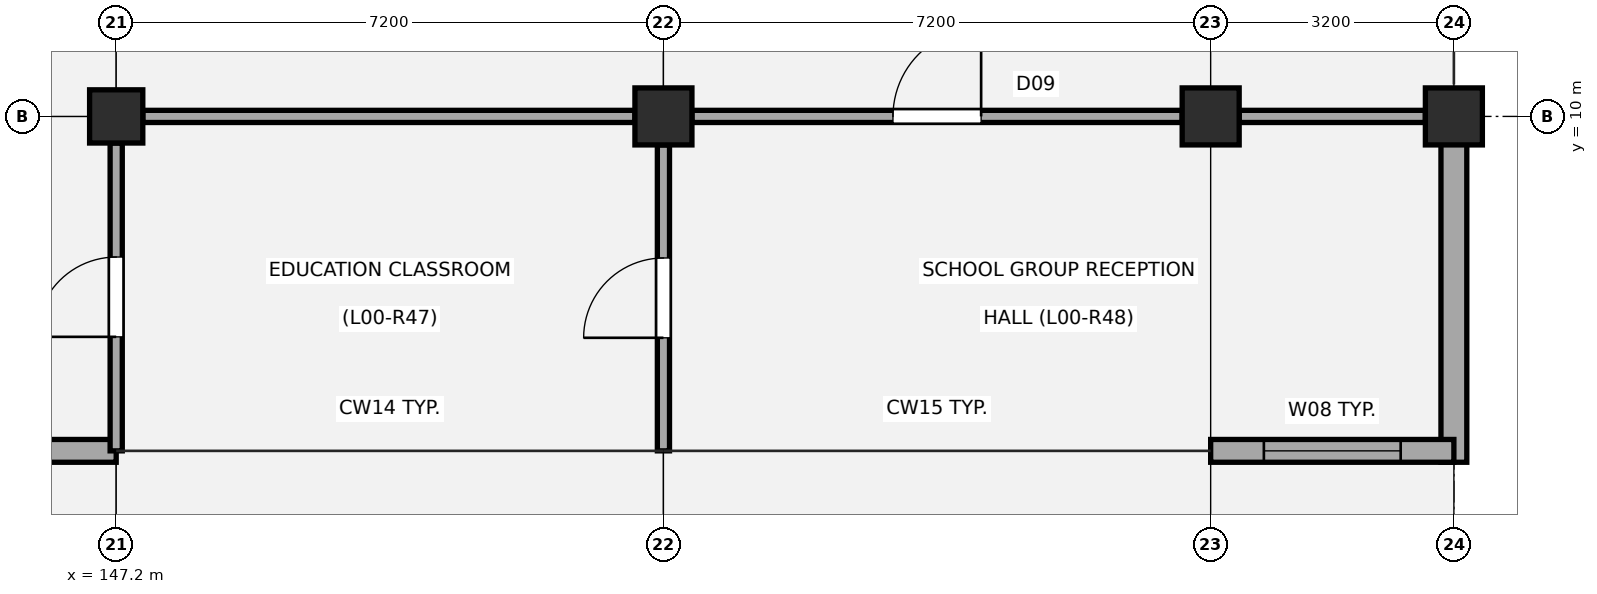
"""IFC4 building model, lengths in metres.
Left out: names, types, materials, properties, quantities, classifications, styles, units other than length and angle.
Written with IfcOpenShell. Run it as: python <this file> out.ifc"""

import sys

from ifc_helpers import new_model, si_unit, direction, frame, frame_2d, origin, origin_2d, place, context, subcontext, project, spatial, rectangle, circle, extrude, element, fill, save


model = new_model("IFC4")
c1 = context("Model", 3, precision=1e-05, world=origin(), true_north=direction((0.0, 1.0)))
c2 = subcontext(c1, "Body", "Model", "MODEL_VIEW")
j1 = project(units=[si_unit("LENGTHUNIT", "METRE"), si_unit("PLANEANGLEUNIT", "RADIAN")], contexts=[c1])
p1 = place(None, origin())
s1 = spatial("IfcSite", under=j1, at=p1, CompositionType="ELEMENT")
p2 = place(p1, origin())
s2 = spatial("IfcBuilding", under=s1, at=p2, CompositionType="ELEMENT")
p3 = place(p2, origin())
s3 = spatial("IfcBuildingStorey", under=s2, at=p3, CompositionType="ELEMENT", Elevation=0.0)
p4 = place(p3, frame((147.2, 10.0, -0.35), z_axis=(0.0, 0.0, 1.0), x_axis=(1.0, 0.0, 0.0)))
e1 = element("IfcColumn", 1, at=p4, inside=s3, PredefinedType="COLUMN", context=c2, shape_type="SweptSolid", body=[
    extrude(rectangle(XDim=0.7, YDim=0.7, at=origin_2d()), origin(), (0.0, 0.0, 1.0), 5.03),
])
for number, where, z_axis, x_axis in (
    (2, (154.4, 10.0, -0.35), (0.0, 0.0, 1.0), (1.0, 0.0, 0.0)),
    (3, (161.6, 10.0, -0.35), (0.0, 0.0, 1.0), (1.0, 0.0, 0.0)),
    (4, (164.8, 10.0, -0.35), (0.0, 0.0, 1.0), (1.0, 0.0, 0.0)),
):
    element("IfcColumn", number, at=place(p3, frame(where, z_axis=z_axis, x_axis=x_axis)), inside=s3, PredefinedType="COLUMN", context=c2, shape_type="SweptSolid", body=[
        extrude(circle(Radius=0.375, at=origin_2d()), origin(), (0.0, 0.0, 1.0), 5.03),
    ])
p5 = place(p3, frame((164.8, 9.69, 0.0), z_axis=(0.0, 0.0, 1.0), x_axis=(0.0, -1.0, 0.0)))
e5 = element("IfcWall", 5, at=p5, inside=s3, PredefinedType="STANDARD", context=c2, shape_type="SweptSolid", body=[
    extrude(rectangle(XDim=4.24, YDim=0.34, at=frame_2d((2.12, 0.0))), origin(), (0.0, 0.0, 1.0), 3.75),
])
p6 = place(p3, frame((147.2, 5.6, 0.0), z_axis=(0.0, 0.0, 1.0), x_axis=(-1.0, 0.0, 0.0)))
e6 = element("IfcWall", 6, at=p6, inside=s3, PredefinedType="STANDARD", context=c2, shape_type="SweptSolid", body=[
    extrude(rectangle(XDim=7.2, YDim=0.3, at=frame_2d((3.6, 0.0))), origin(), (0.0, 0.0, 1.0), 4.37),
])
p7 = place(p6, frame((2.6, 0.0, 0.0)))
e7 = element("IfcOpeningElement", 7, at=p7, cuts=e6, PredefinedType="OPENING", context=c2, shape_type="SweptSolid", body=[
    extrude(rectangle(XDim=2.0, YDim=2.3, at=frame_2d((1.0, 1.15))), frame((0.0, 0.16, 0.0), z_axis=(0.0, -1.0, 0.0), x_axis=(1.0, 0.0, 0.0)), (0.0, 0.0, 1.0), 0.32),
])
p8 = place(p3, frame((164.8, 5.6, 0.0), z_axis=(0.0, 0.0, 1.0), x_axis=(-1.0, 0.0, 0.0)))
e8 = element("IfcWall", 8, at=p8, inside=s3, PredefinedType="STANDARD", context=c2, shape_type="SweptSolid", body=[
    extrude(rectangle(XDim=3.2, YDim=0.3, at=frame_2d((1.6, 0.0))), origin(), (0.0, 0.0, 1.0), 4.37),
])
p9 = place(p8, frame((0.7, 0.0, 0.95)))
e9 = element("IfcOpeningElement", 9, at=p9, cuts=e8, PredefinedType="OPENING", context=c2, shape_type="SweptSolid", body=[
    extrude(rectangle(XDim=1.8, YDim=1.8, at=frame_2d((0.9, 0.9))), frame((0.0, 0.16, 0.0), z_axis=(0.0, -1.0, 0.0), x_axis=(1.0, 0.0, 0.0)), (0.0, 0.0, 1.0), 0.32),
])
p10 = place(p3, frame((147.2, 5.6, 0.0), z_axis=(0.0, 0.0, 1.0), x_axis=(0.0, 1.0, 0.0)))
e10 = element("IfcWall", 10, at=p10, inside=s3, PredefinedType="PARTITIONING", context=c2, shape_type="SweptSolid", body=[
    extrude(rectangle(XDim=4.05, YDim=0.16, at=frame_2d((2.025, 0.0))), origin(), (0.0, 0.0, 1.0), 3.62),
])
p11 = place(p10, frame((1.5, 0.0, 0.0)))
e11 = element("IfcOpeningElement", 11, at=p11, cuts=e10, PredefinedType="OPENING", context=c2, shape_type="SweptSolid", body=[
    extrude(rectangle(XDim=1.05, YDim=2.14, at=frame_2d((0.525, 1.07))), frame((0.0, 0.09, 0.0), z_axis=(0.0, -1.0, 0.0), x_axis=(1.0, 0.0, 0.0)), (0.0, 0.0, 1.0), 0.18),
])
p12 = place(p3, frame((154.4, 5.6, 0.0), z_axis=(0.0, 0.0, 1.0), x_axis=(0.0, 1.0, 0.0)))
e12 = element("IfcWall", 12, at=p12, inside=s3, PredefinedType="PARTITIONING", context=c2, shape_type="SweptSolid", body=[
    extrude(rectangle(XDim=4.025, YDim=0.16, at=frame_2d((2.012, 0.0))), origin(), (0.0, 0.0, 1.0), 3.62),
])
p13 = place(p12, frame((1.488, 0.0, 0.0)))
e13 = element("IfcOpeningElement", 13, at=p13, cuts=e12, PredefinedType="OPENING", context=c2, shape_type="SweptSolid", body=[
    extrude(rectangle(XDim=1.05, YDim=2.14, at=frame_2d((0.525, 1.07))), frame((0.0, 0.09, 0.0), z_axis=(0.0, -1.0, 0.0), x_axis=(1.0, 0.0, 0.0)), (0.0, 0.0, 1.0), 0.18),
])
p14 = place(p3, frame((147.55, 10.0, 0.0), z_axis=(0.0, 0.0, 1.0), x_axis=(1.0, 0.0, 0.0)))
e14 = element("IfcWall", 14, at=p14, inside=s3, PredefinedType="PARTITIONING", context=c2, shape_type="SweptSolid", body=[
    extrude(rectangle(XDim=6.475, YDim=0.16, at=frame_2d((3.237, 0.0))), origin(), (0.0, 0.0, 1.0), 3.62),
])
p15 = place(p3, frame((154.775, 10.0, 0.0), z_axis=(0.0, 0.0, 1.0), x_axis=(1.0, 0.0, 0.0)))
e15 = element("IfcWall", 15, at=p15, inside=s3, PredefinedType="PARTITIONING", context=c2, shape_type="SweptSolid", body=[
    extrude(rectangle(XDim=6.45, YDim=0.16, at=frame_2d((3.225, 0.0))), origin(), (0.0, 0.0, 1.0), 3.6),
])
p16 = place(p15, frame((2.645, 0.0, 0.0)))
e16 = element("IfcOpeningElement", 16, at=p16, cuts=e15, PredefinedType="OPENING", context=c2, shape_type="SweptSolid", body=[
    extrude(rectangle(XDim=1.16, YDim=2.18, at=frame_2d((0.58, 1.09))), frame((0.0, 0.09, 0.0), z_axis=(0.0, -1.0, 0.0), x_axis=(1.0, 0.0, 0.0)), (0.0, 0.0, 1.0), 0.18),
])
p17 = place(p3, frame((161.975, 10.0, 0.0), z_axis=(0.0, 0.0, 1.0), x_axis=(1.0, 0.0, 0.0)))
e17 = element("IfcWall", 17, at=p17, inside=s3, PredefinedType="PARTITIONING", context=c2, shape_type="SweptSolid", body=[
    extrude(rectangle(XDim=2.45, YDim=0.16, at=frame_2d((1.225, 0.0))), origin(), (0.0, 0.0, 1.0), 3.7),
])
p18 = place(p9, origin())
e18 = element("IfcWindow", 18, at=p18, inside=s3, PartitioningType="SINGLE_PANEL", PredefinedType="WINDOW", context=c2, shape_type="SweptSolid", body=[
    extrude(rectangle(XDim=1.8, YDim=1.8, at=frame_2d((0.9, 0.9))), frame((0.0, 0.03, 0.0), z_axis=(0.0, -1.0, 0.0), x_axis=(1.0, 0.0, 0.0)), (0.0, 0.0, 1.0), 0.06),
])
fill(e9, e18)
p19 = place(p11, origin())
e19 = element("IfcDoor", 19, at=p19, inside=s3, OperationType="SINGLE_SWING_LEFT", PredefinedType="DOOR", context=c2, shape_type="SweptSolid", body=[
    extrude(rectangle(XDim=1.05, YDim=2.14, at=frame_2d((0.525, 1.07))), frame((0.0, 0.025, 0.0), z_axis=(0.0, -1.0, 0.0), x_axis=(1.0, 0.0, 0.0)), (0.0, 0.0, 1.0), 0.05),
])
fill(e11, e19)
p20 = place(p16, origin())
e20 = element("IfcDoor", 20, at=p20, inside=s3, OperationType="SINGLE_SWING_RIGHT", PredefinedType="DOOR", context=c2, shape_type="SweptSolid", body=[
    extrude(rectangle(XDim=1.16, YDim=2.18, at=frame_2d((0.58, 1.09))), frame((0.0, 0.025, 0.0), z_axis=(0.0, -1.0, 0.0), x_axis=(1.0, 0.0, 0.0)), (0.0, 0.0, 1.0), 0.05),
])
fill(e16, e20)
p21 = place(p13, origin())
e21 = element("IfcDoor", 21, at=p21, inside=s3, OperationType="SINGLE_SWING_LEFT", PredefinedType="DOOR", context=c2, shape_type="SweptSolid", body=[
    extrude(rectangle(XDim=1.05, YDim=2.14, at=frame_2d((0.525, 1.07))), frame((0.0, 0.025, 0.0), z_axis=(0.0, -1.0, 0.0), x_axis=(1.0, 0.0, 0.0)), (0.0, 0.0, 1.0), 0.05),
])
fill(e13, e21)
save(model, sys.argv[1])
